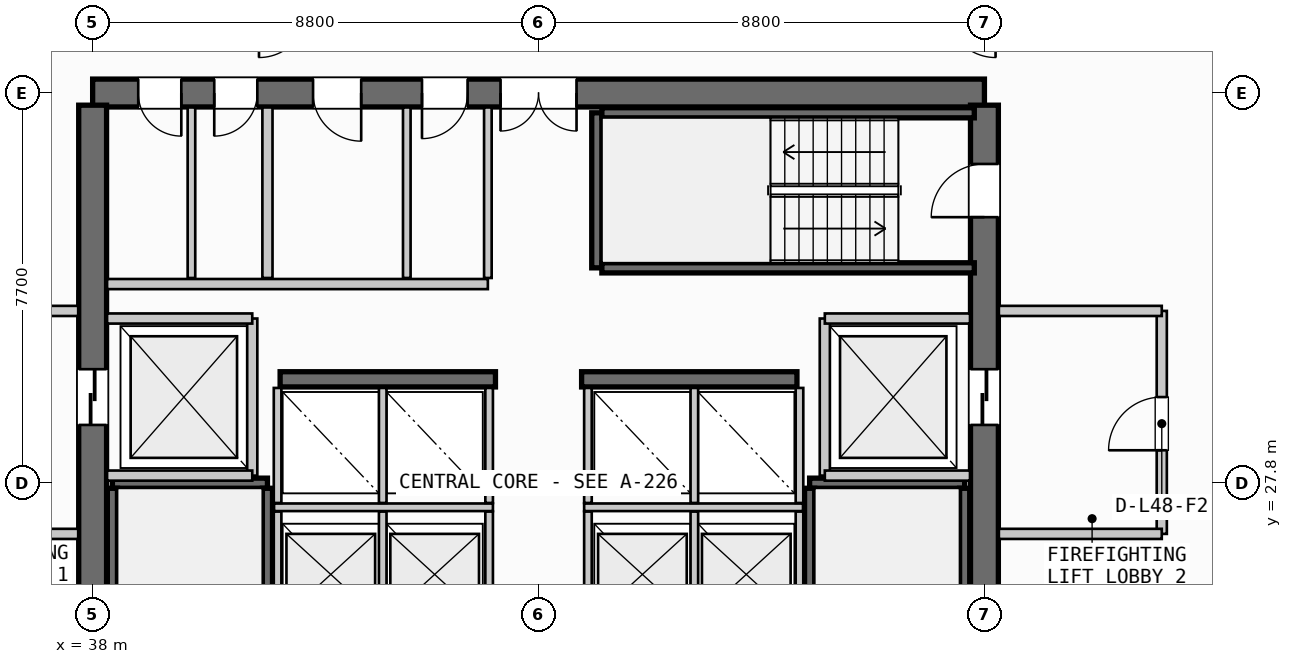
"""IFC4 building model, lengths in metres.
Left out: names, types, materials, properties, quantities, classifications, styles, units other than length and angle.
Written with IfcOpenShell. Run it as: python <this file> out.ifc"""

import sys

from ifc_helpers import new_model, si_unit, direction, frame, frame_2d, origin, place, context, subcontext, project, spatial, rectangle, extrude, source, transform, mapped, element, fill, save


model = new_model("IFC4")
c1 = context("Model", 3, precision=1e-05, world=origin(), true_north=direction((0.0, 1.0)))
c2 = subcontext(c1, "Body", "Model", "MODEL_VIEW")
j1 = project(units=[si_unit("LENGTHUNIT", "METRE"), si_unit("PLANEANGLEUNIT", "RADIAN")], contexts=[c1])
p1 = place(None, origin())
s1 = spatial("IfcSite", under=j1, at=p1, CompositionType="ELEMENT")
p2 = place(p1, origin())
s2 = spatial("IfcBuilding", under=s1, at=p2, CompositionType="ELEMENT")
p3 = place(p2, frame((0.0, 0.0, 186.9)))
s3 = spatial("IfcBuildingStorey", under=s2, at=p3, CompositionType="ELEMENT", Elevation=186.9)
p4 = place(p3, frame((55.6, 35.5, 0.0), z_axis=(0.0, 0.0, 1.0), x_axis=(-1.0, 0.0, 0.0)))
e1 = element("IfcWall", 1, at=p4, inside=s3, PredefinedType="SHEAR", context=c2, shape_type="SweptSolid", body=[
    extrude(rectangle(XDim=17.6, YDim=0.55, at=frame_2d((8.8, 0.0))), origin(), (0.0, 0.0, 1.0), 3.26),
])
p5 = place(p4, frame((8.05, 0.0, 0.0)))
e2 = element("IfcOpeningElement", 2, at=p5, cuts=e1, PredefinedType="OPENING", context=c2, shape_type="SweptSolid", body=[
    extrude(rectangle(XDim=1.5, YDim=2.2, at=frame_2d((0.75, 1.1))), frame((0.0, 0.285, 0.0), z_axis=(0.0, -1.0, 0.0), x_axis=(1.0, 0.0, 0.0)), (0.0, 0.0, 1.0), 0.57),
])
p6 = place(p4, frame((15.85, 0.0, 0.0)))
e3 = element("IfcOpeningElement", 3, at=p6, cuts=e1, PredefinedType="OPENING", context=c2, shape_type="SweptSolid", body=[
    extrude(rectangle(XDim=0.85, YDim=2.15, at=frame_2d((0.425, 1.075))), frame((0.0, 0.285, 0.0), z_axis=(0.0, -1.0, 0.0), x_axis=(1.0, 0.0, 0.0)), (0.0, 0.0, 1.0), 0.57),
])
p7 = place(p4, frame((14.35, 0.0, 0.0)))
e4 = element("IfcOpeningElement", 4, at=p7, cuts=e1, PredefinedType="OPENING", context=c2, shape_type="SweptSolid", body=[
    extrude(rectangle(XDim=0.85, YDim=2.15, at=frame_2d((0.425, 1.075))), frame((0.0, 0.285, 0.0), z_axis=(0.0, -1.0, 0.0), x_axis=(1.0, 0.0, 0.0)), (0.0, 0.0, 1.0), 0.57),
])
p8 = place(p4, frame((12.3, 0.0, 0.0)))
e5 = element("IfcOpeningElement", 5, at=p8, cuts=e1, PredefinedType="OPENING", context=c2, shape_type="SweptSolid", body=[
    extrude(rectangle(XDim=0.95, YDim=2.15, at=frame_2d((0.475, 1.075))), frame((0.0, 0.285, 0.0), z_axis=(0.0, -1.0, 0.0), x_axis=(1.0, 0.0, 0.0)), (0.0, 0.0, 1.0), 0.57),
])
p9 = place(p4, frame((10.2, 0.0, 0.0)))
e6 = element("IfcOpeningElement", 6, at=p9, cuts=e1, PredefinedType="OPENING", context=c2, shape_type="SweptSolid", body=[
    extrude(rectangle(XDim=0.9, YDim=2.15, at=frame_2d((0.45, 1.075))), frame((0.0, 0.285, 0.0), z_axis=(0.0, -1.0, 0.0), x_axis=(1.0, 0.0, 0.0)), (0.0, 0.0, 1.0), 0.57),
])
p10 = place(p3, frame((38.0, 35.26, 0.0), z_axis=(0.0, 0.0, 1.0), x_axis=(0.0, -1.0, 0.0)))
e7 = element("IfcWall", 7, at=p10, inside=s3, PredefinedType="SHEAR", context=c2, shape_type="SweptSolid", body=[
    extrude(rectangle(XDim=14.92, YDim=0.55, at=frame_2d((7.46, 0.0))), origin(), (0.0, 0.0, 1.0), 3.26),
])
p11 = place(p10, frame((5.21, 0.0, 0.0)))
e8 = element("IfcOpeningElement", 8, at=p11, cuts=e7, PredefinedType="OPENING", context=c2, shape_type="SweptSolid", body=[
    extrude(rectangle(XDim=1.1, YDim=2.2, at=frame_2d((0.55, 1.1))), frame((0.0, 0.285, 0.0), z_axis=(0.0, -1.0, 0.0), x_axis=(1.0, 0.0, 0.0)), (0.0, 0.0, 1.0), 0.57),
])
p12 = place(p3, frame((55.6, 20.34, 0.0), z_axis=(0.0, 0.0, 1.0), x_axis=(0.0, 1.0, 0.0)))
e9 = element("IfcWall", 9, at=p12, inside=s3, PredefinedType="SHEAR", context=c2, shape_type="SweptSolid", body=[
    extrude(rectangle(XDim=14.92, YDim=0.55, at=frame_2d((7.46, 0.0))), origin(), (0.0, 0.0, 1.0), 3.26),
])
p13 = place(p12, frame((12.71, 0.0, 0.0)))
e10 = element("IfcOpeningElement", 10, at=p13, cuts=e9, PredefinedType="OPENING", context=c2, shape_type="SweptSolid", body=[
    extrude(rectangle(XDim=1.05, YDim=2.15, at=frame_2d((0.525, 1.075))), frame((0.0, 0.285, 0.0), z_axis=(0.0, -1.0, 0.0), x_axis=(1.0, 0.0, 0.0)), (0.0, 0.0, 1.0), 0.57),
])
p14 = place(p12, frame((8.61, 0.0, 0.0)))
e11 = element("IfcOpeningElement", 11, at=p14, cuts=e9, PredefinedType="OPENING", context=c2, shape_type="SweptSolid", body=[
    extrude(rectangle(XDim=1.1, YDim=2.2, at=frame_2d((0.55, 1.1))), frame((0.0, 0.285, 0.0), z_axis=(0.0, -1.0, 0.0), x_axis=(1.0, 0.0, 0.0)), (0.0, 0.0, 1.0), 0.57),
])
for number, where, z_axis, x_axis in (
    (12, (41.7, 29.85, 0.0), (0.0, 0.0, 1.0), (1.0, 0.0, 0.0)),
    (13, (47.65, 29.85, 0.0), (0.0, 0.0, 1.0), (1.0, 0.0, 0.0)),
):
    element("IfcWall", number, at=place(p3, frame(where, z_axis=z_axis, x_axis=x_axis)), inside=s3, PredefinedType="SHEAR", context=c2, shape_type="SweptSolid", body=[
        extrude(rectangle(XDim=4.25, YDim=0.3, at=frame_2d((2.125, 0.0))), origin(), (0.0, 0.0, 1.0), 3.26),
    ])
p15 = place(p3, frame((38.39, 27.8, 0.0), z_axis=(0.0, 0.0, 1.0), x_axis=(1.0, 0.0, 0.0)))
e14 = element("IfcWall", 14, at=p15, inside=s3, PredefinedType="SHEAR", context=c2, shape_type="SweptSolid", body=[
    extrude(rectangle(XDim=3.06, YDim=0.2, at=frame_2d((1.53, 0.0))), origin(), (0.0, 0.0, 1.0), 3.26),
])
for number, where, z_axis, x_axis in (
    (15, (41.45, 27.7, 0.0), (0.0, 0.0, 1.0), (0.0, -1.0, 0.0)),
    (16, (38.39, 20.35, 0.0), (0.0, 0.0, 1.0), (0.0, 1.0, 0.0)),
):
    element("IfcWall", number, at=place(p3, frame(where, z_axis=z_axis, x_axis=x_axis)), inside=s3, PredefinedType="SHEAR", context=c2, shape_type="SweptSolid", body=[
        extrude(rectangle(XDim=7.35, YDim=0.2, at=frame_2d((3.675, 0.0))), origin(), (0.0, 0.0, 1.0), 3.26),
    ])
p16 = place(p3, frame((52.15, 27.8, 0.0), z_axis=(0.0, 0.0, 1.0), x_axis=(1.0, 0.0, 0.0)))
e17 = element("IfcWall", 17, at=p16, inside=s3, PredefinedType="SHEAR", context=c2, shape_type="SweptSolid", body=[
    extrude(rectangle(XDim=3.06, YDim=0.2, at=frame_2d((1.53, 0.0))), origin(), (0.0, 0.0, 1.0), 3.26),
])
for number, where, z_axis, x_axis in (
    (18, (55.21, 27.7, 0.0), (0.0, 0.0, 1.0), (0.0, -1.0, 0.0)),
    (19, (52.15, 20.35, 0.0), (0.0, 0.0, 1.0), (0.0, 1.0, 0.0)),
):
    element("IfcWall", number, at=place(p3, frame(where, z_axis=z_axis, x_axis=x_axis)), inside=s3, PredefinedType="SHEAR", context=c2, shape_type="SweptSolid", body=[
        extrude(rectangle(XDim=7.35, YDim=0.2, at=frame_2d((3.675, 0.0))), origin(), (0.0, 0.0, 1.0), 3.26),
    ])
p17 = place(p3, frame((47.95, 32.05, 0.0), z_axis=(0.0, 0.0, 1.0), x_axis=(0.0, 1.0, 0.0)))
e20 = element("IfcWall", 20, at=p17, inside=s3, PredefinedType="SHEAR", context=c2, shape_type="SweptSolid", body=[
    extrude(rectangle(XDim=3.06, YDim=0.2, at=frame_2d((1.53, 0.0))), origin(), (0.0, 0.0, 1.0), 3.26),
])
for number, where, z_axis, x_axis in (
    (21, (48.05, 35.11, 0.0), (0.0, 0.0, 1.0), (1.0, 0.0, 0.0)),
    (22, (55.4, 32.05, 0.0), (0.0, 0.0, 1.0), (-1.0, 0.0, 0.0)),
):
    element("IfcWall", number, at=place(p3, frame(where, z_axis=z_axis, x_axis=x_axis)), inside=s3, PredefinedType="SHEAR", context=c2, shape_type="SweptSolid", body=[
        extrude(rectangle(XDim=7.35, YDim=0.2, at=frame_2d((3.675, 0.0))), origin(), (0.0, 0.0, 1.0), 3.26),
    ])
p18 = place(p3, frame((41.15, 27.95, 0.0), z_axis=(0.0, 0.0, 1.0), x_axis=(0.0, 1.0, 0.0)))
e23 = element("IfcWall", 23, at=p18, inside=s3, PredefinedType="PARTITIONING", context=c2, shape_type="SweptSolid", body=[
    extrude(rectangle(XDim=3.1, YDim=0.2, at=frame_2d((1.55, 0.0))), origin(), (0.0, 0.0, 1.0), 2.735),
])
for number, where, z_axis, x_axis in (
    (24, (38.285, 27.95, 0.0), (0.0, 0.0, 1.0), (1.0, 0.0, 0.0)),
    (25, (38.285, 31.05, 0.0), (0.0, 0.0, 1.0), (1.0, 0.0, 0.0)),
):
    element("IfcWall", number, at=place(p3, frame(where, z_axis=z_axis, x_axis=x_axis)), inside=s3, PredefinedType="PARTITIONING", context=c2, shape_type="SweptSolid", body=[
        extrude(rectangle(XDim=2.865, YDim=0.2, at=frame_2d((1.433, 0.0))), origin(), (0.0, 0.0, 1.0), 2.735),
    ])
for number, where, z_axis, x_axis in (
    (26, (34.5, 26.8, 0.0), (0.0, 0.0, 1.0), (1.0, 0.0, 0.0)),
    (27, (34.5, 31.2, 0.0), (0.0, 0.0, 1.0), (1.0, 0.0, 0.0)),
):
    element("IfcWall", number, at=place(p3, frame(where, z_axis=z_axis, x_axis=x_axis)), inside=s3, PredefinedType="PARTITIONING", context=c2, shape_type="SweptSolid", body=[
        extrude(rectangle(XDim=3.215, YDim=0.2, at=frame_2d((1.607, 0.0))), origin(), (0.0, 0.0, 1.0), 2.735),
    ])
p19 = place(p3, frame((52.45, 27.95, 0.0), z_axis=(0.0, 0.0, 1.0), x_axis=(0.0, 1.0, 0.0)))
e28 = element("IfcWall", 28, at=p19, inside=s3, PredefinedType="PARTITIONING", context=c2, shape_type="SweptSolid", body=[
    extrude(rectangle(XDim=3.1, YDim=0.2, at=frame_2d((1.55, 0.0))), origin(), (0.0, 0.0, 1.0), 2.735),
])
for number, where, z_axis, x_axis in (
    (29, (52.45, 27.95, 0.0), (0.0, 0.0, 1.0), (1.0, 0.0, 0.0)),
    (30, (52.45, 31.05, 0.0), (0.0, 0.0, 1.0), (1.0, 0.0, 0.0)),
):
    element("IfcWall", number, at=place(p3, frame(where, z_axis=z_axis, x_axis=x_axis)), inside=s3, PredefinedType="PARTITIONING", context=c2, shape_type="SweptSolid", body=[
        extrude(rectangle(XDim=2.865, YDim=0.2, at=frame_2d((1.433, 0.0))), origin(), (0.0, 0.0, 1.0), 2.735),
    ])
p20 = place(p3, frame((59.1, 26.8, 0.0), z_axis=(0.0, 0.0, 1.0), x_axis=(0.0, 1.0, 0.0)))
e31 = element("IfcWall", 31, at=p20, inside=s3, PredefinedType="PARTITIONING", context=c2, shape_type="SweptSolid", body=[
    extrude(rectangle(XDim=4.4, YDim=0.2, at=frame_2d((2.2, 0.0))), origin(), (0.0, 0.0, 1.0), 2.735),
])
p21 = place(p20, frame((1.65, 0.0, 0.0)))
e32 = element("IfcOpeningElement", 32, at=p21, cuts=e31, PredefinedType="OPENING", context=c2, shape_type="SweptSolid", body=[
    extrude(rectangle(XDim=1.05, YDim=2.15, at=frame_2d((0.525, 1.075))), frame((0.0, 0.11, 0.0), z_axis=(0.0, -1.0, 0.0), x_axis=(1.0, 0.0, 0.0)), (0.0, 0.0, 1.0), 0.22),
])
for number, where, z_axis, x_axis in (
    (33, (55.885, 26.8, 0.0), (0.0, 0.0, 1.0), (1.0, 0.0, 0.0)),
    (34, (55.885, 31.2, 0.0), (0.0, 0.0, 1.0), (1.0, 0.0, 0.0)),
):
    element("IfcWall", number, at=place(p3, frame(where, z_axis=z_axis, x_axis=x_axis)), inside=s3, PredefinedType="PARTITIONING", context=c2, shape_type="SweptSolid", body=[
        extrude(rectangle(XDim=3.215, YDim=0.2, at=frame_2d((1.607, 0.0))), origin(), (0.0, 0.0, 1.0), 2.735),
    ])
p22 = place(p3, frame((41.58, 27.325, 0.0), z_axis=(0.0, 0.0, 1.0), x_axis=(1.0, 0.0, 0.0)))
e35 = element("IfcWall", 35, at=p22, inside=s3, PredefinedType="PARTITIONING", context=c2, shape_type="SweptSolid", body=[
    extrude(rectangle(XDim=4.32, YDim=0.15, at=frame_2d((2.16, 0.0))), origin(), (0.0, 0.0, 1.0), 2.735),
])
p23 = place(p3, frame((47.7, 27.325, 0.0), z_axis=(0.0, 0.0, 1.0), x_axis=(1.0, 0.0, 0.0)))
e36 = element("IfcWall", 36, at=p23, inside=s3, PredefinedType="PARTITIONING", context=c2, shape_type="SweptSolid", body=[
    extrude(rectangle(XDim=4.32, YDim=0.15, at=frame_2d((2.16, 0.0))), origin(), (0.0, 0.0, 1.0), 2.735),
])
for number, where, z_axis, x_axis in (
    (37, (41.65, 24.92, 0.0), (0.0, 0.0, 1.0), (0.0, 1.0, 0.0)),
    (38, (43.725, 24.92, 0.0), (0.0, 0.0, 1.0), (0.0, 1.0, 0.0)),
    (39, (45.825, 24.92, 0.0), (0.0, 0.0, 1.0), (0.0, 1.0, 0.0)),
    (40, (47.775, 24.92, 0.0), (0.0, 0.0, 1.0), (0.0, 1.0, 0.0)),
    (41, (49.875, 24.92, 0.0), (0.0, 0.0, 1.0), (0.0, 1.0, 0.0)),
    (42, (51.95, 24.92, 0.0), (0.0, 0.0, 1.0), (0.0, 1.0, 0.0)),
):
    element("IfcWall", number, at=place(p3, frame(where, z_axis=z_axis, x_axis=x_axis)), inside=s3, PredefinedType="PARTITIONING", context=c2, shape_type="SweptSolid", body=[
        extrude(rectangle(XDim=2.32, YDim=0.15, at=frame_2d((1.16, 0.0))), origin(), (0.0, 0.0, 1.0), 2.735),
    ])
for number, where, z_axis, x_axis in (
    (43, (41.65, 27.41, 0.0), (0.0, 0.0, 1.0), (0.0, 1.0, 0.0)),
    (44, (43.725, 27.41, 0.0), (0.0, 0.0, 1.0), (0.0, 1.0, 0.0)),
    (45, (45.825, 27.41, 0.0), (0.0, 0.0, 1.0), (0.0, 1.0, 0.0)),
    (46, (47.775, 27.41, 0.0), (0.0, 0.0, 1.0), (0.0, 1.0, 0.0)),
    (47, (49.875, 27.41, 0.0), (0.0, 0.0, 1.0), (0.0, 1.0, 0.0)),
    (48, (51.95, 27.41, 0.0), (0.0, 0.0, 1.0), (0.0, 1.0, 0.0)),
):
    element("IfcWall", number, at=place(p3, frame(where, z_axis=z_axis, x_axis=x_axis)), inside=s3, PredefinedType="PARTITIONING", context=c2, shape_type="SweptSolid", body=[
        extrude(rectangle(XDim=2.27, YDim=0.15, at=frame_2d((1.135, 0.0))), origin(), (0.0, 0.0, 1.0), 2.735),
    ])
p24 = place(p3, frame((41.45, 31.85, 0.0), z_axis=(0.0, 0.0, 1.0), x_axis=(0.0, 1.0, 0.0)))
e49 = element("IfcWall", 49, at=p24, inside=s3, PredefinedType="PARTITIONING", context=c2, shape_type="SweptSolid", body=[
    extrude(rectangle(XDim=3.365, YDim=0.2, at=frame_2d((1.683, 0.0))), origin(), (0.0, 0.0, 1.0), 2.735),
])
p25 = place(p3, frame((38.285, 31.73, 0.0), z_axis=(0.0, 0.0, 1.0), x_axis=(1.0, 0.0, 0.0)))
e50 = element("IfcWall", 50, at=p25, inside=s3, PredefinedType="PARTITIONING", context=c2, shape_type="SweptSolid", body=[
    extrude(rectangle(XDim=7.515, YDim=0.2, at=frame_2d((3.758, 0.0))), origin(), (0.0, 0.0, 1.0), 2.735),
])
for number, where, z_axis, x_axis in (
    (51, (45.8, 31.85, 0.0), (0.0, 0.0, 1.0), (0.0, 1.0, 0.0)),
    (52, (39.95, 31.85, 0.0), (0.0, 0.0, 1.0), (0.0, 1.0, 0.0)),
):
    element("IfcWall", number, at=place(p3, frame(where, z_axis=z_axis, x_axis=x_axis)), inside=s3, PredefinedType="PARTITIONING", context=c2, shape_type="SweptSolid", body=[
        extrude(rectangle(XDim=3.365, YDim=0.15, at=frame_2d((1.683, 0.0))), origin(), (0.0, 0.0, 1.0), 2.735),
    ])
p26 = place(p3, frame((44.2, 31.85, 0.0), z_axis=(0.0, 0.0, 1.0), x_axis=(0.0, 1.0, 0.0)))
e53 = element("IfcWall", 53, at=p26, inside=s3, PredefinedType="PLUMBINGWALL", context=c2, shape_type="SweptSolid", body=[
    extrude(rectangle(XDim=3.365, YDim=0.15, at=frame_2d((1.683, 0.0))), origin(), (0.0, 0.0, 1.0), 2.735),
])
m1 = source(origin(), c2, "Body", "SweptSolid", [
    extrude(rectangle(XDim=1.05, YDim=2.15, at=frame_2d((0.525, 1.075))), frame((0.0, 0.025, 0.0), z_axis=(0.0, -1.0, 0.0), x_axis=(1.0, 0.0, 0.0)), (0.0, 0.0, 1.0), 0.05),
])
p27 = place(p13, origin())
e54 = element("IfcDoor", 54, at=p27, inside=s3, OperationType="SINGLE_SWING_LEFT", PredefinedType="DOOR", context=c2, shape_type="MappedRepresentation", body=[
    mapped(m1, transform((0.0, 0.0, 0.0), scale=1.0)),
])
fill(e10, e54)
m2 = source(origin(), c2, "Body", "SweptSolid", [
    extrude(rectangle(XDim=1.5, YDim=2.2, at=frame_2d((0.75, 1.1))), frame((0.0, 0.025, 0.0), z_axis=(0.0, -1.0, 0.0), x_axis=(1.0, 0.0, 0.0)), (0.0, 0.0, 1.0), 0.05),
])
p28 = place(p5, origin())
e55 = element("IfcDoor", 55, at=p28, inside=s3, OperationType="DOUBLE_DOOR_SINGLE_SWING", PredefinedType="DOOR", context=c2, shape_type="MappedRepresentation", body=[
    mapped(m2, transform((0.0, 0.0, 0.0), scale=1.0)),
])
fill(e2, e55)
m3 = source(origin(), c2, "Body", "SweptSolid", [
    extrude(rectangle(XDim=1.1, YDim=2.2, at=frame_2d((0.55, 1.1))), frame((0.0, 0.025, 0.0), z_axis=(0.0, -1.0, 0.0), x_axis=(1.0, 0.0, 0.0)), (0.0, 0.0, 1.0), 0.05),
])
p29 = place(p11, origin())
e56 = element("IfcDoor", 56, at=p29, inside=s3, OperationType="SLIDING_TO_LEFT", PredefinedType="DOOR", context=c2, shape_type="MappedRepresentation", body=[
    mapped(m3, transform((0.0, 0.0, 0.0), scale=1.0)),
])
fill(e8, e56)
p30 = place(p14, origin())
e57 = element("IfcDoor", 57, at=p30, inside=s3, OperationType="SLIDING_TO_RIGHT", PredefinedType="DOOR", context=c2, shape_type="MappedRepresentation", body=[
    mapped(m3, transform((0.0, 0.0, 0.0), scale=1.0)),
])
fill(e11, e57)
m4 = source(origin(), c2, "Body", "SweptSolid", [
    extrude(rectangle(XDim=0.85, YDim=2.15, at=frame_2d((0.425, 1.075))), frame((0.0, 0.025, 0.0), z_axis=(0.0, -1.0, 0.0), x_axis=(1.0, 0.0, 0.0)), (0.0, 0.0, 1.0), 0.05),
])
p31 = place(p6, origin())
e58 = element("IfcDoor", 58, at=p31, inside=s3, OperationType="SINGLE_SWING_LEFT", PredefinedType="DOOR", context=c2, shape_type="MappedRepresentation", body=[
    mapped(m4, transform((0.0, 0.0, 0.0), scale=1.0)),
])
fill(e3, e58)
p32 = place(p7, origin())
e59 = element("IfcDoor", 59, at=p32, inside=s3, OperationType="SINGLE_SWING_RIGHT", PredefinedType="DOOR", context=c2, shape_type="MappedRepresentation", body=[
    mapped(m4, transform((0.0, 0.0, 0.0), scale=1.0)),
])
fill(e4, e59)
m5 = source(origin(), c2, "Body", "SweptSolid", [
    extrude(rectangle(XDim=0.95, YDim=2.15, at=frame_2d((0.475, 1.075))), frame((0.0, 0.025, 0.0), z_axis=(0.0, -1.0, 0.0), x_axis=(1.0, 0.0, 0.0)), (0.0, 0.0, 1.0), 0.05),
])
p33 = place(p8, origin())
e60 = element("IfcDoor", 60, at=p33, inside=s3, OperationType="SINGLE_SWING_LEFT", PredefinedType="DOOR", context=c2, shape_type="MappedRepresentation", body=[
    mapped(m5, transform((0.0, 0.0, 0.0), scale=1.0)),
])
fill(e5, e60)
m6 = source(origin(), c2, "Body", "SweptSolid", [
    extrude(rectangle(XDim=0.9, YDim=2.15, at=frame_2d((0.45, 1.075))), frame((0.0, 0.025, 0.0), z_axis=(0.0, -1.0, 0.0), x_axis=(1.0, 0.0, 0.0)), (0.0, 0.0, 1.0), 0.05),
])
p34 = place(p9, origin())
e61 = element("IfcDoor", 61, at=p34, inside=s3, OperationType="SINGLE_SWING_RIGHT", PredefinedType="DOOR", context=c2, shape_type="MappedRepresentation", body=[
    mapped(m6, transform((0.0, 0.0, 0.0), scale=1.0)),
])
fill(e6, e61)
p35 = place(p21, origin())
e62 = element("IfcDoor", 62, at=p35, inside=s3, OperationType="SINGLE_SWING_LEFT", PredefinedType="DOOR", context=c2, shape_type="MappedRepresentation", body=[
    mapped(m1, transform((0.0, 0.0, 0.0), scale=1.0)),
])
fill(e32, e62)
save(model, sys.argv[1])
